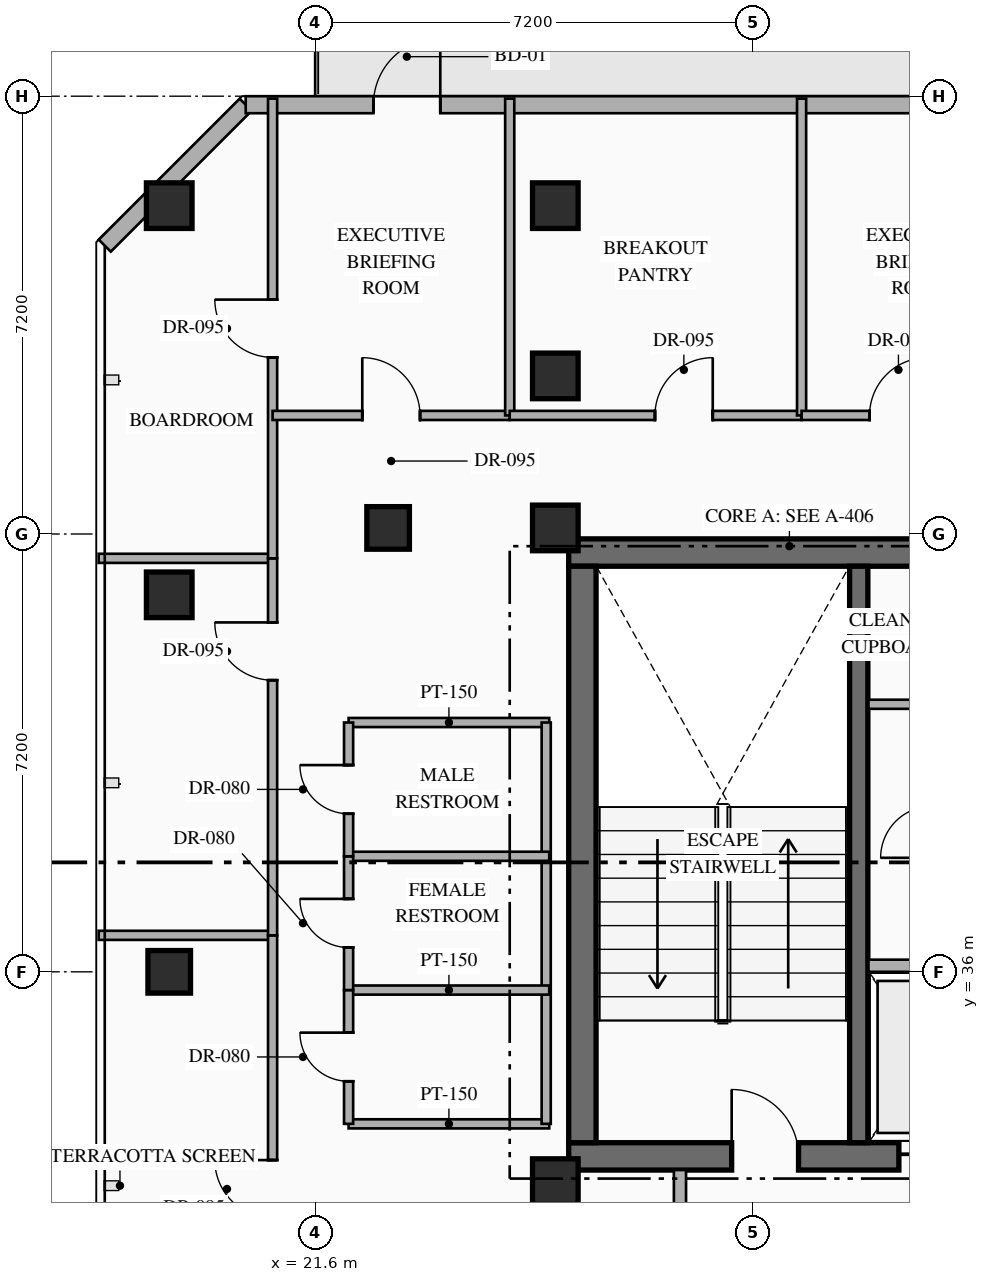
"""IFC4 building model, lengths in metres.
Left out: names, types, materials, properties, quantities, classifications, styles, units other than length and angle.
Written with IfcOpenShell. Run it as: python <this file> out.ifc"""

import sys

from ifc_helpers import new_model, si_unit, direction, frame, frame_2d, origin, origin_2d, place, context, subcontext, project, spatial, rectangle, hollow_rectangle, extrude, element, fill, save


model = new_model("IFC4")
c1 = context("Model", 3, precision=1e-05, world=origin(), true_north=direction((0.0, 1.0)))
c2 = subcontext(c1, "Body", "Model", "MODEL_VIEW")
j1 = project(units=[si_unit("LENGTHUNIT", "METRE"), si_unit("PLANEANGLEUNIT", "RADIAN")], contexts=[c1])
p1 = place(None, origin())
s1 = spatial("IfcSite", under=j1, at=p1, CompositionType="ELEMENT")
p2 = place(p1, origin())
s2 = spatial("IfcBuilding", under=s1, at=p2, CompositionType="ELEMENT")
p3 = place(p2, frame((0.0, 0.0, 209.55)))
s3 = spatial("IfcBuildingStorey", under=s2, at=p3, CompositionType="ELEMENT", Elevation=209.55)
p4 = place(p3, frame((25.77, 32.965, 0.0), z_axis=(0.0, 0.0, 1.0), x_axis=(1.0, 0.0, 0.0)))
e1 = element("IfcWall", 1, at=p4, inside=s3, PredefinedType="SHEAR", context=c2, shape_type="SweptSolid", body=[
    extrude(rectangle(XDim=7.48, YDim=0.45, at=frame_2d((3.74, 0.0))), origin(), (0.0, 0.0, 1.0), 3.6),
])
p5 = place(p4, frame((2.68, 0.0, 0.0)))
e2 = element("IfcOpeningElement", 2, at=p5, cuts=e1, PredefinedType="OPENING", context=c2, shape_type="SweptSolid", body=[
    extrude(rectangle(XDim=1.1, YDim=2.2, at=frame_2d((0.55, 1.1))), frame((0.0, 0.235, 0.0), z_axis=(0.0, -1.0, 0.0), x_axis=(1.0, 0.0, 0.0)), (0.0, 0.0, 1.0), 0.47),
])
p6 = place(p4, frame((5.43, 0.0, 0.0)))
e3 = element("IfcOpeningElement", 3, at=p6, cuts=e1, PredefinedType="OPENING", context=c2, shape_type="SweptSolid", body=[
    extrude(rectangle(XDim=1.1, YDim=2.15, at=frame_2d((0.55, 1.075))), frame((0.0, 0.235, 0.0), z_axis=(0.0, -1.0, 0.0), x_axis=(1.0, 0.0, 0.0)), (0.0, 0.0, 1.0), 0.47),
])
p7 = place(p3, frame((25.77, 42.895, 0.0), z_axis=(0.0, 0.0, 1.0), x_axis=(1.0, 0.0, 0.0)))
e4 = element("IfcWall", 4, at=p7, inside=s3, PredefinedType="SHEAR", context=c2, shape_type="SweptSolid", body=[
    extrude(rectangle(XDim=7.48, YDim=0.45, at=frame_2d((3.74, 0.0))), origin(), (0.0, 0.0, 1.0), 3.6),
])
p8 = place(p3, frame((25.995, 33.19, 0.0), z_axis=(0.0, 0.0, 1.0), x_axis=(0.0, 1.0, 0.0)))
e5 = element("IfcWall", 5, at=p8, inside=s3, PredefinedType="SHEAR", context=c2, shape_type="SweptSolid", body=[
    extrude(rectangle(XDim=9.48, YDim=0.45, at=frame_2d((4.74, 0.0))), origin(), (0.0, 0.0, 1.0), 3.6),
])
p9 = place(p3, frame((30.54, 33.19, 0.0), z_axis=(0.0, 0.0, 1.0), x_axis=(0.0, 1.0, 0.0)))
e6 = element("IfcWall", 6, at=p9, inside=s3, PredefinedType="SHEAR", context=c2, shape_type="SweptSolid", body=[
    extrude(rectangle(XDim=9.48, YDim=0.3, at=frame_2d((4.74, 0.0))), origin(), (0.0, 0.0, 1.0), 3.6),
])
for number, where, z_axis, x_axis in (
    (7, (25.55, 32.55, 0.0), (0.0, 0.0, 1.0), (1.0, 0.0, 0.0)),
    (8, (25.55, 43.3, 0.0), (0.0, 0.0, 1.0), (1.0, 0.0, 0.0)),
    (9, (25.55, 45.8, 0.0), (0.0, 0.0, 1.0), (1.0, 0.0, 0.0)),
    (10, (19.2, 48.6, 0.0), (0.0, 0.0, 1.0), (1.0, 0.0, 0.0)),
    (11, (25.55, 48.6, 0.0), (0.0, 0.0, 1.0), (1.0, 0.0, 0.0)),
    (12, (19.2, 42.2, 0.0), (0.0, 0.0, 1.0), (1.0, 0.0, 0.0)),
):
    element("IfcColumn", number, at=place(p3, frame(where, z_axis=z_axis, x_axis=x_axis)), inside=s3, PredefinedType="COLUMN", context=c2, shape_type="SweptSolid", body=[
        extrude(hollow_rectangle(XDim=0.75, YDim=0.75, WallThickness=0.028, at=origin_2d()), origin(), (0.0, 0.0, 1.0), 3.6),
    ])
for number, where, z_axis, x_axis in (
    (13, (22.8, 43.3, 0.0), (0.0, 0.0, 1.0), (1.0, 0.0, 0.0)),
    (14, (19.2, 36.0, 0.0), (0.0, 0.0, 1.0), (1.0, 0.0, 0.0)),
):
    element("IfcColumn", number, at=place(p3, frame(where, z_axis=z_axis, x_axis=x_axis)), inside=s3, PredefinedType="COLUMN", context=c2, shape_type="SweptSolid", body=[
        extrude(hollow_rectangle(XDim=0.7, YDim=0.7, WallThickness=0.028, at=origin_2d()), origin(), (0.0, 0.0, 1.0), 3.6),
    ])
p10 = place(p3, frame((18.14, 47.942, 0.0), z_axis=(0.0, 0.0, 1.0), x_axis=(0.707106781187, 0.707106781187, 0.0)))
e15 = element("IfcWall", 15, at=p10, inside=s3, PredefinedType="STANDARD", context=c2, shape_type="SweptSolid", body=[
    extrude(rectangle(XDim=3.278, YDim=0.28, at=frame_2d((1.639, 0.0))), origin(), (0.0, 0.0, 1.0), 3.35),
])
p11 = place(p3, frame((20.458, 50.26, 0.0), z_axis=(0.0, 0.0, 1.0), x_axis=(1.0, 0.0, 0.0)))
e16 = element("IfcWall", 16, at=p11, inside=s3, PredefinedType="STANDARD", context=c2, shape_type="SweptSolid", body=[
    extrude(rectangle(XDim=22.084, YDim=0.28, at=frame_2d((11.042, 0.0))), origin(), (0.0, 0.0, 1.0), 3.35),
])
p12 = place(p11, frame((2.1, 0.0, 0.0)))
e17 = element("IfcOpeningElement", 17, at=p12, cuts=e16, PredefinedType="OPENING", context=c2, shape_type="SweptSolid", body=[
    extrude(rectangle(XDim=1.1, YDim=2.2, at=frame_2d((0.55, 1.1))), frame((0.0, 0.15, 0.0), z_axis=(0.0, -1.0, 0.0), x_axis=(1.0, 0.0, 0.0)), (0.0, 0.0, 1.0), 0.3),
])
p13 = place(p11, frame((16.326, 0.0, 0.85)))
e18 = element("IfcOpeningElement", 18, at=p13, cuts=e16, PredefinedType="OPENING", context=c2, shape_type="SweptSolid", body=[
    extrude(rectangle(XDim=1.8, YDim=2.1, at=frame_2d((0.9, 1.05))), frame((0.0, 0.15, 0.0), z_axis=(0.0, -1.0, 0.0), x_axis=(1.0, 0.0, 0.0)), (0.0, 0.0, 1.0), 0.3),
])
p14 = place(p3, frame((30.7, 36.1, 0.0), z_axis=(0.0, 0.0, 1.0), x_axis=(1.0, 0.0, 0.0)))
e19 = element("IfcWall", 19, at=p14, inside=s3, PredefinedType="STANDARD", context=c2, shape_type="SweptSolid", body=[
    extrude(rectangle(XDim=2.1, YDim=0.2, at=frame_2d((1.05, 0.0))), origin(), (0.0, 0.0, 1.0), 3.35),
])
p15 = place(p3, frame((30.7, 40.4, 0.0), z_axis=(0.0, 0.0, 1.0), x_axis=(1.0, 0.0, 0.0)))
e20 = element("IfcWall", 20, at=p15, inside=s3, PredefinedType="PARTITIONING", context=c2, shape_type="SweptSolid", body=[
    extrude(rectangle(XDim=2.1, YDim=0.15, at=frame_2d((1.05, 0.0))), origin(), (0.0, 0.0, 1.0), 3.35),
])
p16 = place(p3, frame((27.6, 29.2, 0.0), z_axis=(0.0, 0.0, 1.0), x_axis=(0.0, 1.0, 0.0)))
e21 = element("IfcWall", 21, at=p16, inside=s3, PredefinedType="STANDARD", context=c2, shape_type="SweptSolid", body=[
    extrude(rectangle(XDim=3.54, YDim=0.2, at=frame_2d((1.77, 0.0))), origin(), (0.0, 0.0, 1.0), 3.35),
])
for number, where, z_axis, x_axis in (
    (22, (22.15, 33.5, 0.0), (0.0, 0.0, 1.0), (1.0, 0.0, 0.0)),
    (23, (22.15, 40.1, 0.0), (0.0, 0.0, 1.0), (1.0, 0.0, 0.0)),
):
    element("IfcWall", number, at=place(p3, frame(where, z_axis=z_axis, x_axis=x_axis)), inside=s3, PredefinedType="PARTITIONING", context=c2, shape_type="SweptSolid", body=[
        extrude(rectangle(XDim=3.3, YDim=0.15, at=frame_2d((1.65, 0.0))), origin(), (0.0, 0.0, 1.0), 3.35),
    ])
p17 = place(p3, frame((25.4, 33.5, 0.0), z_axis=(0.0, 0.0, 1.0), x_axis=(0.0, 1.0, 0.0)))
e24 = element("IfcWall", 24, at=p17, inside=s3, PredefinedType="PARTITIONING", context=c2, shape_type="SweptSolid", body=[
    extrude(rectangle(XDim=6.6, YDim=0.15, at=frame_2d((3.3, 0.0))), origin(), (0.0, 0.0, 1.0), 3.35),
])
for number, where, z_axis, x_axis in (
    (25, (22.15, 35.7, 0.0), (0.0, 0.0, 1.0), (1.0, 0.0, 0.0)),
    (26, (22.15, 37.9, 0.0), (0.0, 0.0, 1.0), (1.0, 0.0, 0.0)),
):
    element("IfcWall", number, at=place(p3, frame(where, z_axis=z_axis, x_axis=x_axis)), inside=s3, PredefinedType="PARTITIONING", context=c2, shape_type="SweptSolid", body=[
        extrude(rectangle(XDim=3.3, YDim=0.15, at=frame_2d((1.65, 0.0))), origin(), (0.0, 0.0, 1.0), 3.35),
    ])
p18 = place(p3, frame((22.15, 33.5, 0.0), z_axis=(0.0, 0.0, 1.0), x_axis=(0.0, 1.0, 0.0)))
e27 = element("IfcWall", 27, at=p18, inside=s3, PredefinedType="PARTITIONING", context=c2, shape_type="SweptSolid", body=[
    extrude(rectangle(XDim=2.2, YDim=0.15, at=frame_2d((1.1, 0.0))), origin(), (0.0, 0.0, 1.0), 3.35),
])
p19 = place(p18, frame((0.7, 0.0, 0.0)))
e28 = element("IfcOpeningElement", 28, at=p19, cuts=e27, PredefinedType="OPENING", context=c2, shape_type="SweptSolid", body=[
    extrude(rectangle(XDim=0.8, YDim=2.06, at=frame_2d((0.4, 1.03))), frame((0.0, 0.085, 0.0), z_axis=(0.0, -1.0, 0.0), x_axis=(1.0, 0.0, 0.0)), (0.0, 0.0, 1.0), 0.17),
])
p20 = place(p3, frame((22.15, 35.7, 0.0), z_axis=(0.0, 0.0, 1.0), x_axis=(0.0, 1.0, 0.0)))
e29 = element("IfcWall", 29, at=p20, inside=s3, PredefinedType="PARTITIONING", context=c2, shape_type="SweptSolid", body=[
    extrude(rectangle(XDim=2.2, YDim=0.15, at=frame_2d((1.1, 0.0))), origin(), (0.0, 0.0, 1.0), 3.35),
])
p21 = place(p20, frame((0.7, 0.0, 0.0)))
e30 = element("IfcOpeningElement", 30, at=p21, cuts=e29, PredefinedType="OPENING", context=c2, shape_type="SweptSolid", body=[
    extrude(rectangle(XDim=0.8, YDim=2.06, at=frame_2d((0.4, 1.03))), frame((0.0, 0.085, 0.0), z_axis=(0.0, -1.0, 0.0), x_axis=(1.0, 0.0, 0.0)), (0.0, 0.0, 1.0), 0.17),
])
p22 = place(p3, frame((22.15, 37.9, 0.0), z_axis=(0.0, 0.0, 1.0), x_axis=(0.0, 1.0, 0.0)))
e31 = element("IfcWall", 31, at=p22, inside=s3, PredefinedType="PARTITIONING", context=c2, shape_type="SweptSolid", body=[
    extrude(rectangle(XDim=2.2, YDim=0.15, at=frame_2d((1.1, 0.0))), origin(), (0.0, 0.0, 1.0), 3.35),
])
p23 = place(p22, frame((0.7, 0.0, 0.0)))
e32 = element("IfcOpeningElement", 32, at=p23, cuts=e31, PredefinedType="OPENING", context=c2, shape_type="SweptSolid", body=[
    extrude(rectangle(XDim=0.8, YDim=2.06, at=frame_2d((0.4, 1.03))), frame((0.0, 0.085, 0.0), z_axis=(0.0, -1.0, 0.0), x_axis=(1.0, 0.0, 0.0)), (0.0, 0.0, 1.0), 0.17),
])
p24 = place(p3, frame((18.04, 36.6, 0.0), z_axis=(0.0, 0.0, 1.0), x_axis=(1.0, 0.0, 0.0)))
e33 = element("IfcWall", 33, at=p24, inside=s3, PredefinedType="PARTITIONING", context=c2, shape_type="SweptSolid", body=[
    extrude(rectangle(XDim=2.86, YDim=0.15, at=frame_2d((1.43, 0.0))), origin(), (0.0, 0.0, 1.0), 3.35),
])
p25 = place(p3, frame((20.9, 31.4, 0.0), z_axis=(0.0, 0.0, 1.0), x_axis=(0.0, 1.0, 0.0)))
e34 = element("IfcWall", 34, at=p25, inside=s3, PredefinedType="PARTITIONING", context=c2, shape_type="SweptSolid", body=[
    extrude(rectangle(XDim=5.2, YDim=0.15, at=frame_2d((2.6, 0.0))), origin(), (0.0, 0.0, 1.0), 3.35),
])
p26 = place(p25, frame((0.554, 0.0, 0.0)))
e35 = element("IfcOpeningElement", 35, at=p26, cuts=e34, PredefinedType="OPENING", context=c2, shape_type="SweptSolid", body=[
    extrude(rectangle(XDim=0.95, YDim=2.15, at=frame_2d((0.475, 1.075))), frame((0.0, 0.085, 0.0), z_axis=(0.0, -1.0, 0.0), x_axis=(1.0, 0.0, 0.0)), (0.0, 0.0, 1.0), 0.17),
])
p27 = place(p3, frame((18.04, 42.8, 0.0), z_axis=(0.0, 0.0, 1.0), x_axis=(1.0, 0.0, 0.0)))
e36 = element("IfcWall", 36, at=p27, inside=s3, PredefinedType="PARTITIONING", context=c2, shape_type="SweptSolid", body=[
    extrude(rectangle(XDim=2.86, YDim=0.15, at=frame_2d((1.43, 0.0))), origin(), (0.0, 0.0, 1.0), 3.35),
])
p28 = place(p3, frame((20.9, 36.6, 0.0), z_axis=(0.0, 0.0, 1.0), x_axis=(0.0, 1.0, 0.0)))
e37 = element("IfcWall", 37, at=p28, inside=s3, PredefinedType="PARTITIONING", context=c2, shape_type="SweptSolid", body=[
    extrude(rectangle(XDim=6.2, YDim=0.15, at=frame_2d((3.1, 0.0))), origin(), (0.0, 0.0, 1.0), 3.35),
])
p29 = place(p28, frame((4.196, 0.0, 0.0)))
e38 = element("IfcOpeningElement", 38, at=p29, cuts=e37, PredefinedType="OPENING", context=c2, shape_type="SweptSolid", body=[
    extrude(rectangle(XDim=0.95, YDim=2.15, at=frame_2d((0.475, 1.075))), frame((0.0, 0.085, 0.0), z_axis=(0.0, -1.0, 0.0), x_axis=(1.0, 0.0, 0.0)), (0.0, 0.0, 1.0), 0.17),
])
p30 = place(p3, frame((20.9, 42.8, 0.0), z_axis=(0.0, 0.0, 1.0), x_axis=(0.0, 1.0, 0.0)))
e39 = element("IfcWall", 39, at=p30, inside=s3, PredefinedType="PARTITIONING", context=c2, shape_type="SweptSolid", body=[
    extrude(rectangle(XDim=7.56, YDim=0.15, at=frame_2d((3.78, 0.0))), origin(), (0.0, 0.0, 1.0), 3.35),
])
p31 = place(p30, frame((3.305, 0.0, 0.0)))
e40 = element("IfcOpeningElement", 40, at=p31, cuts=e39, PredefinedType="OPENING", context=c2, shape_type="SweptSolid", body=[
    extrude(rectangle(XDim=0.95, YDim=2.15, at=frame_2d((0.475, 1.075))), frame((0.0, 0.085, 0.0), z_axis=(0.0, -1.0, 0.0), x_axis=(1.0, 0.0, 0.0)), (0.0, 0.0, 1.0), 0.17),
])
p32 = place(p3, frame((20.9, 45.15, 0.0), z_axis=(0.0, 0.0, 1.0), x_axis=(1.0, 0.0, 0.0)))
e41 = element("IfcWall", 41, at=p32, inside=s3, PredefinedType="PARTITIONING", context=c2, shape_type="SweptSolid", body=[
    extrude(rectangle(XDim=3.9, YDim=0.15, at=frame_2d((1.95, 0.0))), origin(), (0.0, 0.0, 1.0), 3.35),
])
p33 = place(p32, frame((1.475, 0.0, 0.0)))
e42 = element("IfcOpeningElement", 42, at=p33, cuts=e41, PredefinedType="OPENING", context=c2, shape_type="SweptSolid", body=[
    extrude(rectangle(XDim=0.95, YDim=2.15, at=frame_2d((0.475, 1.075))), frame((0.0, 0.085, 0.0), z_axis=(0.0, -1.0, 0.0), x_axis=(1.0, 0.0, 0.0)), (0.0, 0.0, 1.0), 0.17),
])
p34 = place(p3, frame((24.8, 45.15, 0.0), z_axis=(0.0, 0.0, 1.0), x_axis=(0.0, 1.0, 0.0)))
e43 = element("IfcWall", 43, at=p34, inside=s3, PredefinedType="PARTITIONING", context=c2, shape_type="SweptSolid", body=[
    extrude(rectangle(XDim=5.21, YDim=0.15, at=frame_2d((2.605, 0.0))), origin(), (0.0, 0.0, 1.0), 3.35),
])
p35 = place(p3, frame((24.8, 45.15, 0.0), z_axis=(0.0, 0.0, 1.0), x_axis=(1.0, 0.0, 0.0)))
e44 = element("IfcWall", 44, at=p35, inside=s3, PredefinedType="PARTITIONING", context=c2, shape_type="SweptSolid", body=[
    extrude(rectangle(XDim=4.8, YDim=0.15, at=frame_2d((2.4, 0.0))), origin(), (0.0, 0.0, 1.0), 3.35),
])
p36 = place(p35, frame((2.389, 0.0, 0.0)))
e45 = element("IfcOpeningElement", 45, at=p36, cuts=e44, PredefinedType="OPENING", context=c2, shape_type="SweptSolid", body=[
    extrude(rectangle(XDim=0.95, YDim=2.15, at=frame_2d((0.475, 1.075))), frame((0.0, 0.085, 0.0), z_axis=(0.0, -1.0, 0.0), x_axis=(1.0, 0.0, 0.0)), (0.0, 0.0, 1.0), 0.17),
])
p37 = place(p3, frame((29.6, 45.15, 0.0), z_axis=(0.0, 0.0, 1.0), x_axis=(0.0, 1.0, 0.0)))
e46 = element("IfcWall", 46, at=p37, inside=s3, PredefinedType="PARTITIONING", context=c2, shape_type="SweptSolid", body=[
    extrude(rectangle(XDim=5.21, YDim=0.15, at=frame_2d((2.605, 0.0))), origin(), (0.0, 0.0, 1.0), 3.35),
])
p38 = place(p3, frame((29.6, 45.15, 0.0), z_axis=(0.0, 0.0, 1.0), x_axis=(1.0, 0.0, 0.0)))
e47 = element("IfcWall", 47, at=p38, inside=s3, PredefinedType="PARTITIONING", context=c2, shape_type="SweptSolid", body=[
    extrude(rectangle(XDim=5.4, YDim=0.15, at=frame_2d((2.7, 0.0))), origin(), (0.0, 0.0, 1.0), 3.35),
])
p39 = place(p38, frame((1.118, 0.0, 0.0)))
e48 = element("IfcOpeningElement", 48, at=p39, cuts=e47, PredefinedType="OPENING", context=c2, shape_type="SweptSolid", body=[
    extrude(rectangle(XDim=0.95, YDim=2.15, at=frame_2d((0.475, 1.075))), frame((0.0, 0.085, 0.0), z_axis=(0.0, -1.0, 0.0), x_axis=(1.0, 0.0, 0.0)), (0.0, 0.0, 1.0), 0.17),
])
p40 = place(p12, origin())
e49 = element("IfcDoor", 49, at=p40, inside=s3, OperationType="SINGLE_SWING_RIGHT", PredefinedType="DOOR", context=c2, shape_type="SweptSolid", body=[
    extrude(rectangle(XDim=1.1, YDim=2.2, at=frame_2d((0.55, 1.1))), frame((0.0, 0.025, 0.0), z_axis=(0.0, -1.0, 0.0), x_axis=(1.0, 0.0, 0.0)), (0.0, 0.0, 1.0), 0.05),
])
fill(e17, e49)
p41 = place(p5, origin())
e50 = element("IfcDoor", 50, at=p41, inside=s3, OperationType="SINGLE_SWING_LEFT", PredefinedType="DOOR", context=c2, shape_type="SweptSolid", body=[
    extrude(rectangle(XDim=1.1, YDim=2.2, at=frame_2d((0.55, 1.1))), frame((0.0, 0.025, 0.0), z_axis=(0.0, -1.0, 0.0), x_axis=(1.0, 0.0, 0.0)), (0.0, 0.0, 1.0), 0.05),
])
fill(e2, e50)
p42 = place(p6, origin())
e51 = element("IfcDoor", 51, at=p42, inside=s3, OperationType="SLIDING_TO_LEFT", PredefinedType="USERDEFINED", context=c2, shape_type="SweptSolid", body=[
    extrude(rectangle(XDim=1.1, YDim=2.15, at=frame_2d((0.55, 1.075))), frame((0.0, 0.025, 0.0), z_axis=(0.0, -1.0, 0.0), x_axis=(1.0, 0.0, 0.0)), (0.0, 0.0, 1.0), 0.05),
])
fill(e3, e51)
p43 = place(p19, origin())
e52 = element("IfcDoor", 52, at=p43, inside=s3, OperationType="SINGLE_SWING_RIGHT", PredefinedType="DOOR", context=c2, shape_type="SweptSolid", body=[
    extrude(rectangle(XDim=0.8, YDim=2.06, at=frame_2d((0.4, 1.03))), frame((0.0, 0.025, 0.0), z_axis=(0.0, -1.0, 0.0), x_axis=(1.0, 0.0, 0.0)), (0.0, 0.0, 1.0), 0.05),
])
fill(e28, e52)
p44 = place(p21, origin())
e53 = element("IfcDoor", 53, at=p44, inside=s3, OperationType="SINGLE_SWING_RIGHT", PredefinedType="DOOR", context=c2, shape_type="SweptSolid", body=[
    extrude(rectangle(XDim=0.8, YDim=2.06, at=frame_2d((0.4, 1.03))), frame((0.0, 0.025, 0.0), z_axis=(0.0, -1.0, 0.0), x_axis=(1.0, 0.0, 0.0)), (0.0, 0.0, 1.0), 0.05),
])
fill(e30, e53)
p45 = place(p23, origin())
e54 = element("IfcDoor", 54, at=p45, inside=s3, OperationType="SINGLE_SWING_RIGHT", PredefinedType="DOOR", context=c2, shape_type="SweptSolid", body=[
    extrude(rectangle(XDim=0.8, YDim=2.06, at=frame_2d((0.4, 1.03))), frame((0.0, 0.025, 0.0), z_axis=(0.0, -1.0, 0.0), x_axis=(1.0, 0.0, 0.0)), (0.0, 0.0, 1.0), 0.05),
])
fill(e32, e54)
p46 = place(p26, origin())
e55 = element("IfcDoor", 55, at=p46, inside=s3, OperationType="SINGLE_SWING_RIGHT", PredefinedType="DOOR", context=c2, shape_type="SweptSolid", body=[
    extrude(rectangle(XDim=0.95, YDim=2.15, at=frame_2d((0.475, 1.075))), frame((0.0, 0.025, 0.0), z_axis=(0.0, -1.0, 0.0), x_axis=(1.0, 0.0, 0.0)), (0.0, 0.0, 1.0), 0.05),
])
fill(e35, e55)
p47 = place(p29, origin())
e56 = element("IfcDoor", 56, at=p47, inside=s3, OperationType="SINGLE_SWING_RIGHT", PredefinedType="DOOR", context=c2, shape_type="SweptSolid", body=[
    extrude(rectangle(XDim=0.95, YDim=2.15, at=frame_2d((0.475, 1.075))), frame((0.0, 0.025, 0.0), z_axis=(0.0, -1.0, 0.0), x_axis=(1.0, 0.0, 0.0)), (0.0, 0.0, 1.0), 0.05),
])
fill(e38, e56)
p48 = place(p31, origin())
e57 = element("IfcDoor", 57, at=p48, inside=s3, OperationType="SINGLE_SWING_RIGHT", PredefinedType="DOOR", context=c2, shape_type="SweptSolid", body=[
    extrude(rectangle(XDim=0.95, YDim=2.15, at=frame_2d((0.475, 1.075))), frame((0.0, 0.025, 0.0), z_axis=(0.0, -1.0, 0.0), x_axis=(1.0, 0.0, 0.0)), (0.0, 0.0, 1.0), 0.05),
])
fill(e40, e57)
p49 = place(p33, origin())
e58 = element("IfcDoor", 58, at=p49, inside=s3, OperationType="SINGLE_SWING_LEFT", PredefinedType="DOOR", context=c2, shape_type="SweptSolid", body=[
    extrude(rectangle(XDim=0.95, YDim=2.15, at=frame_2d((0.475, 1.075))), frame((0.0, 0.025, 0.0), z_axis=(0.0, -1.0, 0.0), x_axis=(1.0, 0.0, 0.0)), (0.0, 0.0, 1.0), 0.05),
])
fill(e42, e58)
p50 = place(p36, origin())
e59 = element("IfcDoor", 59, at=p50, inside=s3, OperationType="SINGLE_SWING_RIGHT", PredefinedType="DOOR", context=c2, shape_type="SweptSolid", body=[
    extrude(rectangle(XDim=0.95, YDim=2.15, at=frame_2d((0.475, 1.075))), frame((0.0, 0.025, 0.0), z_axis=(0.0, -1.0, 0.0), x_axis=(1.0, 0.0, 0.0)), (0.0, 0.0, 1.0), 0.05),
])
fill(e45, e59)
p51 = place(p39, origin())
e60 = element("IfcDoor", 60, at=p51, inside=s3, OperationType="SINGLE_SWING_RIGHT", PredefinedType="DOOR", context=c2, shape_type="SweptSolid", body=[
    extrude(rectangle(XDim=0.95, YDim=2.15, at=frame_2d((0.475, 1.075))), frame((0.0, 0.025, 0.0), z_axis=(0.0, -1.0, 0.0), x_axis=(1.0, 0.0, 0.0)), (0.0, 0.0, 1.0), 0.05),
])
fill(e48, e60)
save(model, sys.argv[1])
